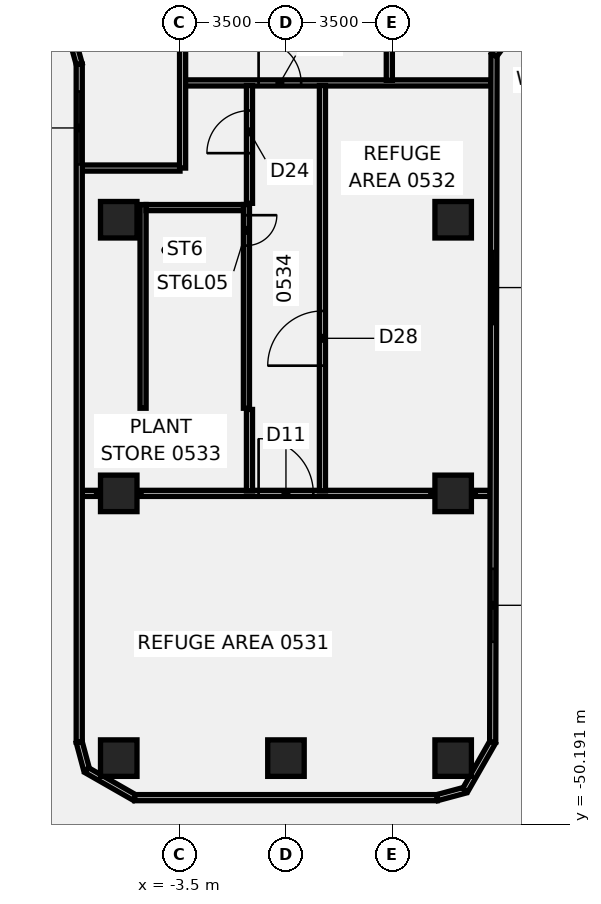
"""IFC4 building model, lengths in metres.
Left out: names, types, materials, properties, quantities, classifications, styles, units other than length and angle.
Written with IfcOpenShell. Run it as: python <this file> out.ifc"""

import sys

from ifc_helpers import new_model, si_unit, direction, frame, frame_2d, origin, origin_2d, place, context, subcontext, project, spatial, polyline, rectangle, outline, extrude, element, fill, save


model = new_model("IFC4")
c1 = context("Model", 3, precision=1e-05, world=origin(), true_north=direction((0.0, 1.0)))
c2 = subcontext(c1, "Body", "Model", "MODEL_VIEW")
j1 = project(units=[si_unit("LENGTHUNIT", "METRE"), si_unit("PLANEANGLEUNIT", "RADIAN")], contexts=[c1])
p1 = place(None, origin())
s1 = spatial("IfcSite", under=j1, at=p1, CompositionType="ELEMENT")
p2 = place(p1, origin())
s2 = spatial("IfcBuilding", under=s1, at=p2, CompositionType="ELEMENT")
p3 = place(p2, frame((0.0, 0.0, 29.5)))
s3 = spatial("IfcBuildingStorey", under=s2, at=p3, CompositionType="ELEMENT", Elevation=29.5)
p4 = place(p3, frame((5.5, -39.3, -0.6), z_axis=(0.0, 0.0, 1.0), x_axis=(1.0, 0.0, 0.0)))
e1 = element("IfcColumn", 1, at=p4, inside=s3, PredefinedType="COLUMN", context=c2, shape_type="SweptSolid", body=[
    extrude(rectangle(XDim=1.2, YDim=1.2, at=origin_2d()), origin(), (0.0, 0.0, 1.0), 4.926),
])
p5 = place(p3, frame((-5.5, -39.3, -0.6), z_axis=(0.0, 0.0, 1.0), x_axis=(1.0, 0.0, 0.0)))
e2 = element("IfcColumn", 2, at=p5, inside=s3, PredefinedType="COLUMN", context=c2, shape_type="SweptSolid", body=[
    extrude(rectangle(XDim=1.2, YDim=1.2, at=origin_2d()), origin(), (0.0, 0.0, 1.0), 4.926),
])
for number, where, z_axis, x_axis in (
    (3, (5.5, -30.3, -0.6), (0.0, 0.0, 1.0), (1.0, 0.0, 0.0)),
    (4, (-5.5, -30.3, -0.6), (0.0, 0.0, 1.0), (1.0, 0.0, 0.0)),
):
    element("IfcColumn", number, at=place(p3, frame(where, z_axis=z_axis, x_axis=x_axis)), inside=s3, PredefinedType="COLUMN", context=c2, shape_type="SweptSolid", body=[
        extrude(rectangle(XDim=1.2, YDim=1.2, at=origin_2d()), origin(), (0.0, 0.0, 1.0), 4.939),
    ])
p6 = place(p3, frame((-5.5, -48.008, -0.6), z_axis=(0.0, 0.0, 1.0), x_axis=(1.0, 0.0, 0.0)))
e5 = element("IfcColumn", 5, at=p6, inside=s3, PredefinedType="COLUMN", context=c2, shape_type="SweptSolid", body=[
    extrude(rectangle(XDim=1.2, YDim=1.2, at=origin_2d()), origin(), (0.0, 0.0, 1.0), 4.918),
])
p7 = place(p3, frame((0.0, -48.008, -0.6), z_axis=(0.0, 0.0, 1.0), x_axis=(1.0, 0.0, 0.0)))
e6 = element("IfcColumn", 6, at=p7, inside=s3, PredefinedType="COLUMN", context=c2, shape_type="SweptSolid", body=[
    extrude(rectangle(XDim=1.2, YDim=1.2, at=origin_2d()), origin(), (0.0, 0.0, 1.0), 4.917),
])
p8 = place(p3, frame((5.5, -48.008, -0.6), z_axis=(0.0, 0.0, 1.0), x_axis=(1.0, 0.0, 0.0)))
e7 = element("IfcColumn", 7, at=p8, inside=s3, PredefinedType="COLUMN", context=c2, shape_type="SweptSolid", body=[
    extrude(rectangle(XDim=1.2, YDim=1.2, at=origin_2d()), origin(), (0.0, 0.0, 1.0), 4.909),
])
p9 = place(p3, frame((-6.699, -39.3, 0.0), z_axis=(0.0, 0.0, 1.0), x_axis=(1.0, 0.0, 0.0)))
e8 = element("IfcWall", 8, at=p9, inside=s3, PredefinedType="PARTITIONING", context=c2, shape_type="SweptSolid", body=[
    extrude(rectangle(XDim=0.469, YDim=0.2, at=frame_2d((0.234, 0.0))), origin(), (0.0, 0.0, 1.0), 3.76),
])
p10 = place(p3, frame((-4.77, -39.3, 0.0), z_axis=(0.0, 0.0, 1.0), x_axis=(1.0, 0.0, 0.0)))
e9 = element("IfcWall", 9, at=p10, inside=s3, PredefinedType="PARTITIONING", context=c2, shape_type="SweptSolid", body=[
    extrude(rectangle(XDim=9.54, YDim=0.2, at=frame_2d((4.77, 0.0))), origin(), (0.0, 0.0, 1.0), 3.76),
])
p11 = place(p10, frame((3.87, 0.0, 0.0)))
e10 = element("IfcOpeningElement", 10, at=p11, cuts=e9, PredefinedType="OPENING", context=c2, shape_type="SweptSolid", body=[
    extrude(rectangle(XDim=1.8, YDim=2.1, at=frame_2d((0.9, 1.05))), frame((0.0, 0.11, 0.0), z_axis=(0.0, -1.0, 0.0), x_axis=(1.0, 0.0, 0.0)), (0.0, 0.0, 1.0), 0.22),
])
p12 = place(p3, frame((6.23, -39.3, 0.0), z_axis=(0.0, 0.0, 1.0), x_axis=(1.0, 0.0, 0.0)))
e11 = element("IfcWall", 11, at=p12, inside=s3, PredefinedType="PARTITIONING", context=c2, shape_type="SweptSolid", body=[
    extrude(rectangle(XDim=0.485, YDim=0.2, at=frame_2d((0.243, 0.0))), origin(), (0.0, 0.0, 1.0), 3.76),
])
p13 = place(p3, frame((-6.699, -28.6, 0.0), z_axis=(0.0, 0.0, 1.0), x_axis=(1.0, 0.0, 0.0)))
e12 = element("IfcWall", 12, at=p13, inside=s3, PredefinedType="PARTITIONING", context=c2, shape_type="SweptSolid", body=[
    extrude(rectangle(XDim=3.214, YDim=0.2, at=frame_2d((1.607, 0.0))), origin(), (0.0, 0.0, 1.0), 3.76),
])
p14 = place(p3, frame((-3.315, -25.8, 0.0), z_axis=(0.0, 0.0, 1.0), x_axis=(1.0, 0.0, 0.0)))
e13 = element("IfcWall", 13, at=p14, inside=s3, PredefinedType="PARTITIONING", context=c2, shape_type="SweptSolid", body=[
    extrude(rectangle(XDim=10.057, YDim=0.2, at=frame_2d((5.028, 0.0))), origin(), (0.0, 0.0, 1.0), 3.76),
])
p15 = place(p14, frame((2.415, 0.0, 0.0)))
e14 = element("IfcOpeningElement", 14, at=p15, cuts=e13, PredefinedType="OPENING", context=c2, shape_type="SweptSolid", body=[
    extrude(rectangle(XDim=1.4, YDim=2.1, at=frame_2d((0.7, 1.05))), frame((0.0, 0.11, 0.0), z_axis=(0.0, -1.0, 0.0), x_axis=(1.0, 0.0, 0.0)), (0.0, 0.0, 1.0), 0.22),
])
p16 = place(p3, frame((-3.4, -28.6, 0.0), z_axis=(0.0, 0.0, 1.0), x_axis=(0.0, 1.0, 0.0)))
e15 = element("IfcWall", 15, at=p16, inside=s3, PredefinedType="PARTITIONING", context=c2, shape_type="SweptSolid", body=[
    extrude(rectangle(XDim=5.889, YDim=0.2, at=frame_2d((2.945, 0.0))), origin(), (0.0, 0.0, 1.0), 3.76),
])
p17 = place(p3, frame((-1.2, -39.22, 0.0), z_axis=(0.0, 0.0, 1.0), x_axis=(0.0, 1.0, 0.0)))
e16 = element("IfcWall", 16, at=p17, inside=s3, PredefinedType="PARTITIONING", context=c2, shape_type="SweptSolid", body=[
    extrude(rectangle(XDim=2.68, YDim=0.2, at=frame_2d((1.34, 0.0))), origin(), (0.0, 0.0, 1.0), 3.76),
])
p18 = place(p3, frame((-1.2, -29.76, 0.0), z_axis=(0.0, 0.0, 1.0), x_axis=(0.0, 1.0, 0.0)))
e17 = element("IfcWall", 17, at=p18, inside=s3, PredefinedType="PARTITIONING", context=c2, shape_type="SweptSolid", body=[
    extrude(rectangle(XDim=3.875, YDim=0.2, at=frame_2d((1.938, 0.0))), origin(), (0.0, 0.0, 1.0), 3.76),
])
p19 = place(p18, frame((1.65, 0.0, 0.0)))
e18 = element("IfcOpeningElement", 18, at=p19, cuts=e17, PredefinedType="OPENING", context=c2, shape_type="SweptSolid", body=[
    extrude(rectangle(XDim=1.4, YDim=2.1, at=frame_2d((0.7, 1.05))), frame((0.0, 0.11, 0.0), z_axis=(0.0, -1.0, 0.0), x_axis=(1.0, 0.0, 0.0)), (0.0, 0.0, 1.0), 0.22),
])
p20 = place(p3, frame((1.2, -39.22, 0.0), z_axis=(0.0, 0.0, 1.0), x_axis=(0.0, 1.0, 0.0)))
e19 = element("IfcWall", 19, at=p20, inside=s3, PredefinedType="PARTITIONING", context=c2, shape_type="SweptSolid", body=[
    extrude(rectangle(XDim=13.335, YDim=0.2, at=frame_2d((6.667, 0.0))), origin(), (0.0, 0.0, 1.0), 3.76),
])
p21 = place(p20, frame((4.12, 0.0, 0.0)))
e20 = element("IfcOpeningElement", 20, at=p21, cuts=e19, PredefinedType="OPENING", context=c2, shape_type="SweptSolid", body=[
    extrude(rectangle(XDim=1.8, YDim=2.1, at=frame_2d((0.9, 1.05))), frame((0.0, 0.11, 0.0), z_axis=(0.0, -1.0, 0.0), x_axis=(1.0, 0.0, 0.0)), (0.0, 0.0, 1.0), 0.22),
])
p22 = place(p3, frame((3.4, -25.715, 0.0), z_axis=(0.0, 0.0, 1.0), x_axis=(0.0, 1.0, 0.0)))
e21 = element("IfcWall", 21, at=p22, inside=s3, PredefinedType="PARTITIONING", context=c2, shape_type="SweptSolid", body=[
    extrude(rectangle(XDim=3.004, YDim=0.2, at=frame_2d((1.502, 0.0))), origin(), (0.0, 0.0, 1.0), 3.76),
])
p23 = place(p3, frame((-7.25, -23.569, 0.0), z_axis=(0.0, 0.0, 1.0), x_axis=(0.268802114608, -0.963195423153, 0.0)))
e22 = element("IfcWall", 22, at=p23, inside=s3, PredefinedType="SOLIDWALL", context=c2, shape_type="SweptSolid", body=[
    extrude(rectangle(XDim=1.674, YDim=0.2, at=frame_2d((0.837, 0.0))), origin(), (0.0, 0.0, 1.0), 4.36),
])
p24 = place(p3, frame((-6.8, -25.181, 0.0), z_axis=(0.0, 0.0, 1.0), x_axis=(0.0, -1.0, 0.0)))
e23 = element("IfcWall", 23, at=p24, inside=s3, PredefinedType="SOLIDWALL", context=c2, shape_type="SweptSolid", body=[
    extrude(rectangle(XDim=22.3, YDim=0.2, at=frame_2d((11.15, 0.0))), origin(), (0.0, 0.0, 1.0), 4.36),
])
p25 = place(p24, frame((0.9, 0.0, 1.4)))
e24 = element("IfcOpeningElement", 24, at=p25, cuts=e23, PredefinedType="OPENING", context=c2, shape_type="SweptSolid", body=[
    extrude(rectangle(XDim=2.4, YDim=2.1, at=frame_2d((1.2, 1.05))), frame((0.0, 0.11, 0.0), z_axis=(0.0, -1.0, 0.0), x_axis=(1.0, 0.0, 0.0)), (0.0, 0.0, 1.0), 0.22),
])
p26 = place(p3, frame((-6.8, -47.481, 0.0), z_axis=(0.0, 0.0, 1.0), x_axis=(0.258855296676, -0.96591611198, 0.0)))
e25 = element("IfcWall", 25, at=p26, inside=s3, PredefinedType="SOLIDWALL", context=c2, shape_type="SweptSolid", body=[
    extrude(rectangle(XDim=0.955, YDim=0.2, at=frame_2d((0.478, 0.0))), origin(), (0.0, 0.0, 1.0), 4.36),
])
p27 = place(p3, frame((-6.553, -48.404, 0.0), z_axis=(0.0, 0.0, 1.0), x_axis=(0.867953965836, -0.496644654848, 0.0)))
e26 = element("IfcWall", 26, at=p27, inside=s3, PredefinedType="SOLIDWALL", context=c2, shape_type="SweptSolid", body=[
    extrude(rectangle(XDim=1.819, YDim=0.2, at=frame_2d((0.91, 0.0))), origin(), (0.0, 0.0, 1.0), 4.36),
])
p28 = place(p3, frame((-4.974, -49.308, 0.0), z_axis=(0.0, 0.0, 1.0), x_axis=(1.0, 0.0, 0.0)))
e27 = element("IfcWall", 27, at=p28, inside=s3, PredefinedType="SOLIDWALL", context=c2, shape_type="SweptSolid", body=[
    extrude(rectangle(XDim=9.947, YDim=0.2, at=frame_2d((4.974, 0.0))), origin(), (0.0, 0.0, 1.0), 4.36),
])
p29 = place(p3, frame((4.974, -49.308, 0.0), z_axis=(0.0, 0.0, 1.0), x_axis=(0.96591611198, 0.258855296676, 0.0)))
e28 = element("IfcWall", 28, at=p29, inside=s3, PredefinedType="SOLIDWALL", context=c2, shape_type="SweptSolid", body=[
    extrude(rectangle(XDim=0.955, YDim=0.2, at=frame_2d((0.478, 0.0))), origin(), (0.0, 0.0, 1.0), 4.36),
])
p30 = place(p3, frame((5.896, -49.06, 0.0), z_axis=(0.0, 0.0, 1.0), x_axis=(0.496586815041, 0.867987059309, 0.0)))
e29 = element("IfcWall", 29, at=p30, inside=s3, PredefinedType="SOLIDWALL", context=c2, shape_type="SweptSolid", body=[
    extrude(rectangle(XDim=1.82, YDim=0.2, at=frame_2d((0.91, 0.0))), origin(), (0.0, 0.0, 1.0), 4.36),
])
p31 = place(p3, frame((6.8, -47.481, 0.0), z_axis=(0.0, 0.0, 1.0), x_axis=(0.001966415802, 0.999998066603, 0.0)))
e30 = element("IfcWall", 30, at=p31, inside=s3, PredefinedType="SOLIDWALL", context=c2, shape_type="SweptSolid", body=[
    extrude(rectangle(XDim=22.596, YDim=0.2, at=frame_2d((11.298, 0.0))), origin(), (0.0, 0.0, 1.0), 4.36),
])
p32 = place(p31, frame((3.3, 0.0, 1.4)))
e31 = element("IfcOpeningElement", 31, at=p32, cuts=e30, PredefinedType="OPENING", context=c2, shape_type="SweptSolid", body=[
    extrude(rectangle(XDim=2.4, YDim=2.1, at=frame_2d((1.2, 1.05))), frame((0.0, 0.11, 0.0), z_axis=(0.0, -1.0, 0.0), x_axis=(1.0, 0.0, 0.0)), (0.0, 0.0, 1.0), 0.22),
])
p33 = place(p31, frame((13.75, 0.0, 1.4)))
e32 = element("IfcOpeningElement", 32, at=p33, cuts=e30, PredefinedType="OPENING", context=c2, shape_type="SweptSolid", body=[
    extrude(rectangle(XDim=2.4, YDim=2.1, at=frame_2d((1.2, 1.05))), frame((0.0, 0.11, 0.0), z_axis=(0.0, -1.0, 0.0), x_axis=(1.0, 0.0, 0.0)), (0.0, 0.0, 1.0), 0.22),
])
p34 = place(p3, frame((6.844, -24.885, 0.0), z_axis=(0.0, 0.0, 1.0), x_axis=(0.594098572278, 0.804392246617, 0.0)))
e33 = element("IfcWall", 33, at=p34, inside=s3, PredefinedType="SOLIDWALL", context=c2, shape_type="SweptSolid", body=[
    extrude(rectangle(XDim=3.544, YDim=0.2, at=frame_2d((1.772, 0.0))), origin(), (0.0, 0.0, 1.0), 4.36),
])
p35 = place(p34, frame((0.9, 0.0, 1.4)))
e34 = element("IfcOpeningElement", 34, at=p35, cuts=e33, PredefinedType="OPENING", context=c2, shape_type="SweptSolid", body=[
    extrude(rectangle(XDim=2.4, YDim=2.1, at=frame_2d((1.2, 1.05))), frame((0.0, 0.11, 0.0), z_axis=(0.0, -1.0, 0.0), x_axis=(1.0, 0.0, 0.0)), (0.0, 0.0, 1.0), 0.22),
])
p36 = place(p3, frame((-1.3, -29.8, 0.0), z_axis=(0.0, 0.0, 1.0), x_axis=(0.0, -1.0, 0.0)))
e35 = element("IfcWall", 35, at=p36, inside=s3, PredefinedType="SHEAR", context=c2, shape_type="SweptSolid", body=[
    extrude(rectangle(XDim=6.7, YDim=0.2, at=frame_2d((3.35, 0.0))), origin(), (0.0, 0.0, 1.0), 3.76),
])
p37 = place(p36, frame((0.35, 0.0, 0.0)))
e36 = element("IfcOpeningElement", 36, at=p37, cuts=e35, PredefinedType="OPENING", context=c2, shape_type="SweptSolid", body=[
    extrude(rectangle(XDim=1.0, YDim=2.1, at=frame_2d((0.5, 1.05))), frame((0.0, 0.11, 0.0), z_axis=(0.0, -1.0, 0.0), x_axis=(1.0, 0.0, 0.0)), (0.0, 0.0, 1.0), 0.22),
])
p38 = place(p3, frame((-4.7, -29.8, 0.0), z_axis=(0.0, 0.0, 1.0), x_axis=(0.0, -1.0, 0.0)))
e37 = element("IfcWall", 37, at=p38, inside=s3, PredefinedType="SHEAR", context=c2, shape_type="SweptSolid", body=[
    extrude(rectangle(XDim=6.7, YDim=0.2, at=frame_2d((3.35, 0.0))), origin(), (0.0, 0.0, 1.0), 3.76),
])
p39 = place(p3, frame((-4.6, -29.9, 0.0), z_axis=(0.0, 0.0, 1.0), x_axis=(1.0, 0.0, 0.0)))
e38 = element("IfcWall", 38, at=p39, inside=s3, PredefinedType="SHEAR", context=c2, shape_type="SweptSolid", body=[
    extrude(rectangle(XDim=3.2, YDim=0.2, at=frame_2d((1.6, 0.0))), origin(), (0.0, 0.0, 1.0), 3.76),
])
p40 = place(p3, origin())
e39 = element("IfcWall", 39, at=p40, inside=s3, PredefinedType="SHEAR", context=c2, shape_type="SweptSolid", body=[
    extrude(outline(polyline([(-4.6, -36.3), (-4.6, -36.5), (-1.4, -36.5), (-1.4, -36.3), (-4.6, -36.3)])), origin(), (0.0, 0.0, 1.0), 3.76),
])
p41 = place(p11, frame((1.8, 0.0, 0.0), z_axis=(0.0, 0.0, 1.0), x_axis=(-1.0, 0.0, 0.0)))
e40 = element("IfcDoor", 40, at=p41, inside=s3, OperationType="DOUBLE_DOOR_SINGLE_SWING", PredefinedType="DOOR", context=c2, shape_type="SweptSolid", body=[
    extrude(rectangle(XDim=1.8, YDim=2.1, at=frame_2d((0.9, 1.05))), frame((0.0, 0.025, 0.0), z_axis=(0.0, -1.0, 0.0), x_axis=(1.0, 0.0, 0.0)), (0.0, 0.0, 1.0), 0.05),
])
fill(e10, e40)
p42 = place(p15, origin())
e41 = element("IfcDoor", 41, at=p42, inside=s3, OperationType="DOUBLE_DOOR_SINGLE_SWING", PredefinedType="DOOR", context=c2, shape_type="SweptSolid", body=[
    extrude(rectangle(XDim=1.4, YDim=2.1, at=frame_2d((0.7, 1.05))), frame((0.0, 0.025, 0.0), z_axis=(0.0, -1.0, 0.0), x_axis=(1.0, 0.0, 0.0)), (0.0, 0.0, 1.0), 0.05),
])
fill(e14, e41)
p43 = place(p19, origin())
e42 = element("IfcDoor", 42, at=p43, inside=s3, OperationType="DOUBLE_DOOR_SINGLE_SWING", PredefinedType="DOOR", context=c2, shape_type="SweptSolid", body=[
    extrude(rectangle(XDim=1.4, YDim=2.1, at=frame_2d((0.7, 1.05))), frame((0.0, 0.025, 0.0), z_axis=(0.0, -1.0, 0.0), x_axis=(1.0, 0.0, 0.0)), (0.0, 0.0, 1.0), 0.05),
])
fill(e18, e42)
p44 = place(p21, frame((1.8, 0.0, 0.0), z_axis=(0.0, 0.0, 1.0), x_axis=(-1.0, 0.0, 0.0)))
e43 = element("IfcDoor", 43, at=p44, inside=s3, OperationType="DOUBLE_DOOR_SINGLE_SWING", PredefinedType="DOOR", context=c2, shape_type="SweptSolid", body=[
    extrude(rectangle(XDim=1.8, YDim=2.1, at=frame_2d((0.9, 1.05))), frame((0.0, 0.025, 0.0), z_axis=(0.0, -1.0, 0.0), x_axis=(1.0, 0.0, 0.0)), (0.0, 0.0, 1.0), 0.05),
])
fill(e20, e43)
p45 = place(p25, origin())
e44 = element("IfcWindow", 44, at=p45, inside=s3, PartitioningType="SINGLE_PANEL", PredefinedType="WINDOW", context=c2, shape_type="SweptSolid", body=[
    extrude(rectangle(XDim=2.4, YDim=2.1, at=frame_2d((1.2, 1.05))), frame((0.0, 0.03, 0.0), z_axis=(0.0, -1.0, 0.0), x_axis=(1.0, 0.0, 0.0)), (0.0, 0.0, 1.0), 0.06),
])
fill(e24, e44)
p46 = place(p32, origin())
e45 = element("IfcWindow", 45, at=p46, inside=s3, PartitioningType="SINGLE_PANEL", PredefinedType="WINDOW", context=c2, shape_type="SweptSolid", body=[
    extrude(rectangle(XDim=2.4, YDim=2.1, at=frame_2d((1.2, 1.05))), frame((0.0, 0.03, 0.0), z_axis=(0.0, -1.0, 0.0), x_axis=(1.0, 0.0, 0.0)), (0.0, 0.0, 1.0), 0.06),
])
fill(e31, e45)
p47 = place(p33, origin())
e46 = element("IfcWindow", 46, at=p47, inside=s3, PartitioningType="SINGLE_PANEL", PredefinedType="WINDOW", context=c2, shape_type="SweptSolid", body=[
    extrude(rectangle(XDim=2.4, YDim=2.1, at=frame_2d((1.2, 1.05))), frame((0.0, 0.03, 0.0), z_axis=(0.0, -1.0, 0.0), x_axis=(1.0, 0.0, 0.0)), (0.0, 0.0, 1.0), 0.06),
])
fill(e32, e46)
p48 = place(p37, origin())
e47 = element("IfcDoor", 47, at=p48, inside=s3, OperationType="SINGLE_SWING_LEFT", PredefinedType="DOOR", context=c2, shape_type="SweptSolid", body=[
    extrude(rectangle(XDim=1.0, YDim=2.1, at=frame_2d((0.5, 1.05))), frame((0.0, 0.025, 0.0), z_axis=(0.0, -1.0, 0.0), x_axis=(1.0, 0.0, 0.0)), (0.0, 0.0, 1.0), 0.05),
])
fill(e36, e47)
save(model, sys.argv[1])
